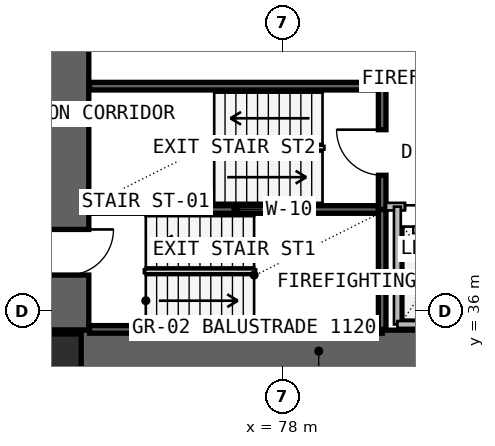
"""IFC4 building model, lengths in metres.
Left out: names, types, materials, properties, quantities, classifications, styles, units other than length and angle.
Written with IfcOpenShell. Run it as: python <this file> out.ifc"""

import sys

from ifc_helpers import new_model, si_unit, direction, frame, frame_2d, origin, origin_2d, place, context, subcontext, project, spatial, rectangle, extrude, element, fill, save


model = new_model("IFC4")
c1 = context("Model", 3, precision=1e-05, world=origin(), true_north=direction((0.0, 1.0)))
c2 = subcontext(c1, "Body", "Model", "MODEL_VIEW")
j1 = project(units=[si_unit("LENGTHUNIT", "METRE"), si_unit("PLANEANGLEUNIT", "RADIAN")], contexts=[c1])
p1 = place(None, origin())
s1 = spatial("IfcSite", under=j1, at=p1, CompositionType="ELEMENT")
p2 = place(p1, origin())
s2 = spatial("IfcBuilding", under=s1, at=p2, CompositionType="ELEMENT")
p3 = place(p2, frame((0.0, 0.0, 26.7)))
s3 = spatial("IfcBuildingStorey", under=s2, at=p3, CompositionType="ELEMENT", Elevation=26.7)
p4 = place(p3, frame((72.35, 35.5, -0.4), z_axis=(0.0, 0.0, 1.0), x_axis=(0.0, 1.0, 0.0)))
e1 = element("IfcWall", 1, at=p4, inside=s3, PredefinedType="SHEAR", context=c2, shape_type="SweptSolid", body=[
    extrude(rectangle(XDim=7.85, YDim=1.1, at=frame_2d((3.925, 0.0))), origin(), (0.0, 0.0, 1.0), 3.8),
])
p5 = place(p4, frame((1.45, 0.0, 0.4)))
e2 = element("IfcOpeningElement", 2, at=p5, cuts=e1, PredefinedType="OPENING", context=c2, shape_type="SweptSolid", body=[
    extrude(rectangle(XDim=1.2, YDim=2.2, at=frame_2d((0.6, 1.1))), frame((0.0, 0.56, 0.0), z_axis=(0.0, -1.0, 0.0), x_axis=(1.0, 0.0, 0.0)), (0.0, 0.0, 1.0), 1.12),
])
p6 = place(p3, frame((71.8, 34.95, -0.4), z_axis=(0.0, 0.0, 1.0), x_axis=(1.0, 0.0, 0.0)))
e3 = element("IfcWall", 3, at=p6, inside=s3, PredefinedType="SHEAR", context=c2, shape_type="SweptSolid", body=[
    extrude(rectangle(XDim=14.3, YDim=1.1, at=frame_2d((7.15, 0.0))), origin(), (0.0, 0.0, 1.0), 3.8),
])
p7 = place(p3, frame((72.0, 34.7, 0.0), z_axis=(0.0, 0.0, 1.0), x_axis=(1.0, 0.0, 0.0)))
e4 = element("IfcColumn", 4, at=p7, inside=s3, PredefinedType="COLUMN", context=c2, shape_type="SweptSolid", body=[
    extrude(rectangle(XDim=1.4, YDim=1.4, at=origin_2d()), origin(), (0.0, 0.0, 1.0), 3.6),
])
for number, where, z_axis, x_axis in (
    (5, (72.92, 35.52, -0.4), (0.0, 0.0, 1.0), (1.0, 0.0, 0.0)),
    (6, (72.92, 38.675, -0.4), (0.0, 0.0, 1.0), (1.0, 0.0, 0.0)),
):
    element("IfcWall", number, at=place(p3, frame(where, z_axis=z_axis, x_axis=x_axis)), inside=s3, PredefinedType="SOLIDWALL", context=c2, shape_type="SweptSolid", body=[
        extrude(rectangle(XDim=7.7, YDim=0.2, at=frame_2d((3.85, 0.0))), origin(), (0.0, 0.0, 1.0), 3.8),
    ])
p8 = place(p3, frame((80.62, 35.52, -0.4), z_axis=(0.0, 0.0, 1.0), x_axis=(0.0, 1.0, 0.0)))
e7 = element("IfcWall", 7, at=p8, inside=s3, PredefinedType="SOLIDWALL", context=c2, shape_type="SweptSolid", body=[
    extrude(rectangle(XDim=3.155, YDim=0.2, at=frame_2d((1.578, 0.0))), origin(), (0.0, 0.0, 1.0), 3.8),
])
p9 = place(p3, frame((80.62, 38.675, -0.4), z_axis=(0.0, 0.0, 1.0), x_axis=(0.0, 1.0, 0.0)))
e8 = element("IfcWall", 8, at=p9, inside=s3, PredefinedType="SOLIDWALL", context=c2, shape_type="SweptSolid", body=[
    extrude(rectangle(XDim=3.245, YDim=0.2, at=frame_2d((1.623, 0.0))), origin(), (0.0, 0.0, 1.0), 3.8),
])
p10 = place(p9, frame((0.9, 0.0, 0.4)))
e9 = element("IfcOpeningElement", 9, at=p10, cuts=e8, PredefinedType="OPENING", context=c2, shape_type="SweptSolid", body=[
    extrude(rectangle(XDim=1.2, YDim=2.2, at=frame_2d((0.6, 1.1))), frame((0.0, 0.11, 0.0), z_axis=(0.0, -1.0, 0.0), x_axis=(1.0, 0.0, 0.0)), (0.0, 0.0, 1.0), 0.22),
])
p11 = place(p3, frame((80.72, 38.75, 0.0), z_axis=(0.0, 0.0, 1.0), x_axis=(1.0, 0.0, 0.0)))
e10 = element("IfcWall", 10, at=p11, inside=s3, PredefinedType="SOLIDWALL", context=c2, shape_type="SweptSolid", body=[
    extrude(rectangle(XDim=4.26, YDim=0.2, at=frame_2d((2.13, 0.0))), origin(), (0.0, 0.0, 1.0), 3.4),
])
p12 = place(p11, frame((0.5, 0.0, 0.0)))
e11 = element("IfcOpeningElement", 11, at=p12, cuts=e10, PredefinedType="OPENING", context=c2, shape_type="SweptSolid", body=[
    extrude(rectangle(XDim=1.3, YDim=2.3, at=frame_2d((0.65, 1.15))), frame((0.0, 0.11, 0.0), z_axis=(0.0, -1.0, 0.0), x_axis=(1.0, 0.0, 0.0)), (0.0, 0.0, 1.0), 0.22),
])
p13 = place(p11, frame((2.45, 0.0, 0.0)))
e12 = element("IfcOpeningElement", 12, at=p13, cuts=e10, PredefinedType="OPENING", context=c2, shape_type="SweptSolid", body=[
    extrude(rectangle(XDim=1.3, YDim=2.3, at=frame_2d((0.65, 1.15))), frame((0.0, 0.11, 0.0), z_axis=(0.0, -1.0, 0.0), x_axis=(1.0, 0.0, 0.0)), (0.0, 0.0, 1.0), 0.22),
])
p14 = place(p3, frame((81.02, 35.65, 0.0), z_axis=(0.0, 0.0, 1.0), x_axis=(0.0, 1.0, 0.0)))
e13 = element("IfcWall", 13, at=p14, inside=s3, PredefinedType="SOLIDWALL", context=c2, shape_type="SweptSolid", body=[
    extrude(rectangle(XDim=3.1, YDim=0.18, at=frame_2d((1.55, 0.0))), origin(), (0.0, 0.0, 1.0), 3.4),
])
p15 = place(p3, frame((81.02, 35.65, 0.0), z_axis=(0.0, 0.0, 1.0), x_axis=(1.0, 0.0, 0.0)))
e14 = element("IfcWall", 14, at=p15, inside=s3, PredefinedType="SOLIDWALL", context=c2, shape_type="SweptSolid", body=[
    extrude(rectangle(XDim=3.93, YDim=0.18, at=frame_2d((1.965, 0.0))), origin(), (0.0, 0.0, 1.0), 3.4),
])
p16 = place(p3, frame((72.92, 41.92, -0.4), z_axis=(0.0, 0.0, 1.0), x_axis=(1.0, 0.0, 0.0)))
e15 = element("IfcWall", 15, at=p16, inside=s3, PredefinedType="SOLIDWALL", context=c2, shape_type="SweptSolid", body=[
    extrude(rectangle(XDim=7.58, YDim=0.2, at=frame_2d((3.79, 0.0))), origin(), (0.0, 0.0, 1.0), 3.8),
])
p17 = place(p5, frame((1.2, 0.0, 0.0), z_axis=(0.0, 0.0, 1.0), x_axis=(-1.0, 0.0, 0.0)))
e16 = element("IfcDoor", 16, at=p17, inside=s3, OperationType="SINGLE_SWING_LEFT", PredefinedType="USERDEFINED", context=c2, shape_type="SweptSolid", body=[
    extrude(rectangle(XDim=1.2, YDim=2.2, at=frame_2d((0.6, 1.1))), frame((0.0, 0.025, 0.0), z_axis=(0.0, -1.0, 0.0), x_axis=(1.0, 0.0, 0.0)), (0.0, 0.0, 1.0), 0.05),
])
fill(e2, e16)
p18 = place(p10, origin())
e17 = element("IfcDoor", 17, at=p18, inside=s3, OperationType="SINGLE_SWING_RIGHT", PredefinedType="USERDEFINED", context=c2, shape_type="SweptSolid", body=[
    extrude(rectangle(XDim=1.2, YDim=2.2, at=frame_2d((0.6, 1.1))), frame((0.0, 0.025, 0.0), z_axis=(0.0, -1.0, 0.0), x_axis=(1.0, 0.0, 0.0)), (0.0, 0.0, 1.0), 0.05),
])
fill(e9, e17)
p19 = place(p12, origin())
e18 = element("IfcDoor", 18, at=p19, inside=s3, OperationType="DOUBLE_DOOR_SLIDING", PredefinedType="DOOR", context=c2, shape_type="SweptSolid", body=[
    extrude(rectangle(XDim=1.3, YDim=2.3, at=frame_2d((0.65, 1.15))), frame((0.0, 0.025, 0.0), z_axis=(0.0, -1.0, 0.0), x_axis=(1.0, 0.0, 0.0)), (0.0, 0.0, 1.0), 0.05),
])
fill(e11, e18)
save(model, sys.argv[1])
